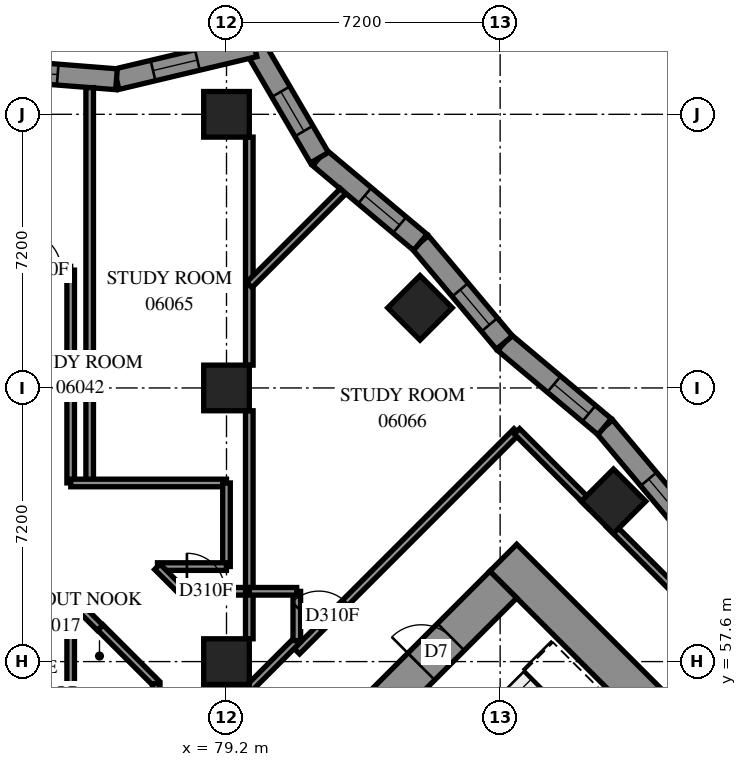
"""IFC4 building model, lengths in metres.
Left out: names, types, materials, properties, quantities, classifications, styles, units other than length and angle.
Written with IfcOpenShell. Run it as: python <this file> out.ifc"""

import sys

from ifc_helpers import new_model, si_unit, direction, frame, frame_2d, origin, origin_2d, place, context, subcontext, project, spatial, polyline, rectangle, outline, extrude, element, fill, save


model = new_model("IFC4")
c1 = context("Model", 3, precision=1e-05, world=origin(), true_north=direction((0.0, 1.0)))
c2 = subcontext(c1, "Body", "Model", "MODEL_VIEW")
j1 = project(units=[si_unit("LENGTHUNIT", "METRE"), si_unit("PLANEANGLEUNIT", "RADIAN")], contexts=[c1])
p1 = place(None, origin())
s1 = spatial("IfcSite", under=j1, at=p1, CompositionType="ELEMENT")
p2 = place(p1, origin())
s2 = spatial("IfcBuilding", under=s1, at=p2, CompositionType="ELEMENT")
p3 = place(p2, frame((0.0, 0.0, 27.0)))
s3 = spatial("IfcBuildingStorey", under=s2, at=p3, CompositionType="ELEMENT", Elevation=27.0)
for number, where, z_axis, x_axis in (
    (1, (79.2, 57.6, 0.0), (0.0, 0.0, 1.0), (1.0, 0.0, 0.0)),
    (2, (79.2, 64.8, 0.0), (0.0, 0.0, 1.0), (1.0, 0.0, 0.0)),
    (3, (79.2, 72.0, 0.0), (0.0, 0.0, 1.0), (1.0, 0.0, 0.0)),
    (4, (84.291, 66.909, 0.0), (0.0, 0.0, 1.0), (0.707, -0.707, 0.0)),
    (5, (89.382, 61.818, 0.0), (0.0, 0.0, 1.0), (0.707, -0.707, 0.0)),
):
    element("IfcColumn", number, at=place(p3, frame(where, z_axis=z_axis, x_axis=x_axis)), inside=s3, PredefinedType="COLUMN", context=c2, shape_type="SweptSolid", body=[
        extrude(rectangle(XDim=1.2, YDim=1.2, at=origin_2d()), origin(), (0.0, 0.0, 1.0), 3.1),
    ])
p4 = place(p3, frame((86.483, 60.333, -0.3), z_axis=(0.0, 0.0, 1.0), x_axis=(0.70710983, -0.7071037324, 0.0)))
e6 = element("IfcWall", 6, at=p4, inside=s3, PredefinedType="SHEAR", context=c2, shape_type="SweptSolid", body=[
    extrude(rectangle(XDim=16.4, YDim=1.0, at=frame_2d((8.2, 0.0))), origin(), (0.0, 0.0, 1.0), 2.7),
])
p5 = place(p4, frame((11.0, 0.0, 0.3)))
e7 = element("IfcOpeningElement", 7, at=p5, cuts=e6, PredefinedType="OPENING", context=c2, shape_type="SweptSolid", body=[
    extrude(rectangle(XDim=0.8, YDim=2.1, at=frame_2d((0.4, 1.05))), frame((0.0, 0.51, 0.0), z_axis=(0.0, -1.0, 0.0), x_axis=(1.0, 0.0, 0.0)), (0.0, 0.0, 1.0), 1.02),
])
p6 = place(p3, frame((76.301, 49.443, -0.3), z_axis=(0.0, 0.0, 1.0), x_axis=(0.7071067812, 0.7071067812, 0.0)))
e8 = element("IfcWall", 8, at=p6, inside=s3, PredefinedType="SHEAR", context=c2, shape_type="SweptSolid", body=[
    extrude(rectangle(XDim=14.4, YDim=1.0, at=frame_2d((7.2, 0.0))), origin(), (0.0, 0.0, 1.0), 2.7),
])
p7 = place(p6, frame((4.55, 0.0, 0.3)))
e9 = element("IfcOpeningElement", 9, at=p7, cuts=e8, PredefinedType="OPENING", context=c2, shape_type="SweptSolid", body=[
    extrude(rectangle(XDim=1.1, YDim=2.1, at=frame_2d((0.55, 1.05))), frame((0.0, 0.51, 0.0), z_axis=(0.0, -1.0, 0.0), x_axis=(1.0, 0.0, 0.0)), (0.0, 0.0, 1.0), 1.02),
])
p8 = place(p6, frame((11.35, 0.0, 0.3)))
e10 = element("IfcOpeningElement", 10, at=p8, cuts=e8, PredefinedType="OPENING", context=c2, shape_type="SweptSolid", body=[
    extrude(rectangle(XDim=1.1, YDim=2.1, at=frame_2d((0.55, 1.05))), frame((0.0, 0.51, 0.0), z_axis=(0.0, -1.0, 0.0), x_axis=(1.0, 0.0, 0.0)), (0.0, 0.0, 1.0), 1.02),
])
p9 = place(p3, frame((91.363, 61.144, 0.0), z_axis=(0.0, 0.0, 1.0), x_axis=(-0.6428036801, 0.7660309582, 0.0)))
e11 = element("IfcWall", 11, at=p9, inside=s3, PredefinedType="SOLIDWALL", context=c2, shape_type="SweptSolid", body=[
    extrude(outline(polyline([(0.024, -0.275), (3.466, -0.275), (3.418, 0.275), (-0.024, 0.275), (0.024, -0.275)])), origin(), (0.0, 0.0, 1.0), 3.1),
])
p10 = place(p9, frame((0.442, 0.0, 0.5)))
e12 = element("IfcOpeningElement", 12, at=p10, cuts=e11, PredefinedType="OPENING", context=c2, shape_type="SweptSolid", body=[
    extrude(rectangle(XDim=1.2, YDim=2.45, at=frame_2d((0.6, 1.225))), frame((0.0, 0.285, 0.0), z_axis=(0.0, -1.0, 0.0), x_axis=(1.0, 0.0, 0.0)), (0.0, 0.0, 1.0), 0.57),
])
p11 = place(p3, frame((89.15, 63.781, 0.0), z_axis=(0.0, 0.0, 1.0), x_axis=(-0.7660309582, 0.6428036801, 0.0)))
e13 = element("IfcWall", 13, at=p11, inside=s3, PredefinedType="SOLIDWALL", context=c2, shape_type="SweptSolid", body=[
    extrude(outline(polyline([(-0.024, -0.275), (3.418, -0.275), (3.466, 0.275), (0.024, 0.275), (-0.024, -0.275)])), origin(), (0.0, 0.0, 1.0), 3.1),
])
p12 = place(p11, frame((0.54, 0.0, 0.5)))
e14 = element("IfcOpeningElement", 14, at=p12, cuts=e13, PredefinedType="OPENING", context=c2, shape_type="SweptSolid", body=[
    extrude(rectangle(XDim=1.2, YDim=2.45, at=frame_2d((0.6, 1.225))), frame((0.0, 0.285, 0.0), z_axis=(0.0, -1.0, 0.0), x_axis=(1.0, 0.0, 0.0)), (0.0, 0.0, 1.0), 0.57),
])
p13 = place(p3, frame((86.513, 65.994, 0.0), z_axis=(0.0, 0.0, 1.0), x_axis=(-0.6427893761, 0.7660429609, 0.0)))
e15 = element("IfcWall", 15, at=p13, inside=s3, PredefinedType="SOLIDWALL", context=c2, shape_type="SweptSolid", body=[
    extrude(outline(polyline([(0.024, -0.275), (3.466, -0.275), (3.418, 0.275), (-0.024, 0.275), (0.024, -0.275)])), origin(), (0.0, 0.0, 1.0), 3.1),
])
p14 = place(p13, frame((0.613, 0.0, 0.5)))
e16 = element("IfcOpeningElement", 16, at=p14, cuts=e15, PredefinedType="OPENING", context=c2, shape_type="SweptSolid", body=[
    extrude(rectangle(XDim=1.2, YDim=2.45, at=frame_2d((0.6, 1.225))), frame((0.0, 0.285, 0.0), z_axis=(0.0, -1.0, 0.0), x_axis=(1.0, 0.0, 0.0)), (0.0, 0.0, 1.0), 0.57),
])
p15 = place(p3, frame((84.3, 68.631, 0.0), z_axis=(0.0, 0.0, 1.0), x_axis=(-0.7660412241, 0.6427914459, 0.0)))
e17 = element("IfcWall", 17, at=p15, inside=s3, PredefinedType="SOLIDWALL", context=c2, shape_type="SweptSolid", body=[
    extrude(outline(polyline([(-0.024, -0.275), (3.418, -0.275), (3.514, 0.275), (0.024, 0.275), (-0.024, -0.275)])), origin(), (0.0, 0.0, 1.0), 3.1),
])
p16 = place(p15, frame((0.711, 0.0, 0.5)))
e18 = element("IfcOpeningElement", 18, at=p16, cuts=e17, PredefinedType="OPENING", context=c2, shape_type="SweptSolid", body=[
    extrude(rectangle(XDim=1.2, YDim=2.45, at=frame_2d((0.6, 1.225))), frame((0.0, 0.285, 0.0), z_axis=(0.0, -1.0, 0.0), x_axis=(1.0, 0.0, 0.0)), (0.0, 0.0, 1.0), 0.57),
])
p17 = place(p3, frame((81.645, 70.859, 0.0), z_axis=(0.0, 0.0, 1.0), x_axis=(-0.5044689103, 0.8634298573, 0.0)))
e19 = element("IfcWall", 19, at=p17, inside=s3, PredefinedType="SOLIDWALL", context=c2, shape_type="SweptSolid", body=[
    extrude(outline(polyline([(0.048, -0.275), (3.593, -0.275), (3.186, 0.275), (-0.048, 0.275), (0.048, -0.275)])), origin(), (0.0, 0.0, 1.0), 3.1),
])
p18 = place(p17, frame((0.811, 0.0, 0.5)))
e20 = element("IfcOpeningElement", 20, at=p18, cuts=e19, PredefinedType="OPENING", context=c2, shape_type="SweptSolid", body=[
    extrude(rectangle(XDim=1.2, YDim=2.45, at=frame_2d((0.6, 1.225))), frame((0.0, 0.285, 0.0), z_axis=(0.0, -1.0, 0.0), x_axis=(1.0, 0.0, 0.0)), (0.0, 0.0, 1.0), 0.57),
])
p19 = place(p3, frame((79.935, 73.785, 0.0), z_axis=(0.0, 0.0, 1.0), x_axis=(-0.9728826648, -0.2312992014, 0.0)))
e21 = element("IfcWall", 21, at=p19, inside=s3, PredefinedType="SOLIDWALL", context=c2, shape_type="SweptSolid", body=[
    extrude(outline(polyline([(-0.204, -0.275), (3.687, -0.275), (3.774, 0.275), (0.204, 0.275), (-0.204, -0.275)])), origin(), (0.0, 0.0, 1.0), 3.1),
])
p20 = place(p19, frame((1.543, 0.0, 0.5)))
e22 = element("IfcOpeningElement", 22, at=p20, cuts=e21, PredefinedType="OPENING", context=c2, shape_type="SweptSolid", body=[
    extrude(rectangle(XDim=1.2, YDim=2.45, at=frame_2d((0.6, 1.225))), frame((0.0, 0.285, 0.0), z_axis=(0.0, -1.0, 0.0), x_axis=(1.0, 0.0, 0.0)), (0.0, 0.0, 1.0), 0.57),
])
p21 = place(p3, frame((76.306, 72.922, 0.0), z_axis=(0.0, 0.0, 1.0), x_axis=(-0.9968745318, 0.0790010628, 0.0)))
e23 = element("IfcWall", 23, at=p21, inside=s3, PredefinedType="SOLIDWALL", context=c2, shape_type="SweptSolid", body=[
    extrude(outline(polyline([(0.043, -0.275), (3.841, -0.275), (3.797, 0.275), (-0.043, 0.275), (0.043, -0.275)])), origin(), (0.0, 0.0, 1.0), 3.1),
])
p22 = place(p21, frame((1.553, 0.0, 0.5)))
e24 = element("IfcOpeningElement", 24, at=p22, cuts=e23, PredefinedType="OPENING", context=c2, shape_type="SweptSolid", body=[
    extrude(rectangle(XDim=1.2, YDim=2.45, at=frame_2d((0.6, 1.225))), frame((0.0, 0.285, 0.0), z_axis=(0.0, -1.0, 0.0), x_axis=(1.0, 0.0, 0.0)), (0.0, 0.0, 1.0), 0.57),
])
p23 = place(p3, frame((54.5, 67.9, 0.0), z_axis=(0.0, 0.0, 1.0), x_axis=(1.0, 0.0, 0.0)))
e25 = element("IfcWall", 25, at=p23, inside=s3, PredefinedType="PARTITIONING", context=c2, shape_type="SweptSolid", body=[
    extrude(rectangle(XDim=20.6, YDim=0.2, at=frame_2d((10.3, 0.0))), origin(), (0.0, 0.0, 1.0), 3.1),
])
p24 = place(p23, frame((0.255, 0.0, 0.0)))
e26 = element("IfcOpeningElement", 26, at=p24, cuts=e25, PredefinedType="OPENING", context=c2, shape_type="SweptSolid", body=[
    extrude(rectangle(XDim=1.0, YDim=2.1, at=frame_2d((0.5, 1.05))), frame((0.0, 0.11, 0.0), z_axis=(0.0, -1.0, 0.0), x_axis=(1.0, 0.0, 0.0)), (0.0, 0.0, 1.0), 0.22),
])
p25 = place(p23, frame((19.345, 0.0, 0.0)))
e27 = element("IfcOpeningElement", 27, at=p25, cuts=e25, PredefinedType="OPENING", context=c2, shape_type="SweptSolid", body=[
    extrude(rectangle(XDim=1.0, YDim=2.1, at=frame_2d((0.5, 1.05))), frame((0.0, 0.11, 0.0), z_axis=(0.0, -1.0, 0.0), x_axis=(1.0, 0.0, 0.0)), (0.0, 0.0, 1.0), 0.22),
])
p26 = place(p23, frame((5.45, 0.0, 0.0)))
e28 = element("IfcOpeningElement", 28, at=p26, cuts=e25, PredefinedType="OPENING", context=c2, shape_type="SweptSolid", body=[
    extrude(rectangle(XDim=0.9, YDim=2.1, at=frame_2d((0.45, 1.05))), frame((0.0, 0.11, 0.0), z_axis=(0.0, -1.0, 0.0), x_axis=(1.0, 0.0, 0.0)), (0.0, 0.0, 1.0), 0.22),
])
p27 = place(p23, frame((7.1, 0.0, 0.0)))
e29 = element("IfcOpeningElement", 29, at=p27, cuts=e25, PredefinedType="OPENING", context=c2, shape_type="SweptSolid", body=[
    extrude(rectangle(XDim=0.9, YDim=2.1, at=frame_2d((0.45, 1.05))), frame((0.0, 0.11, 0.0), z_axis=(0.0, -1.0, 0.0), x_axis=(1.0, 0.0, 0.0)), (0.0, 0.0, 1.0), 0.22),
])
p28 = place(p23, frame((12.65, 0.0, 0.0)))
e30 = element("IfcOpeningElement", 30, at=p28, cuts=e25, PredefinedType="OPENING", context=c2, shape_type="SweptSolid", body=[
    extrude(rectangle(XDim=0.9, YDim=2.1, at=frame_2d((0.45, 1.05))), frame((0.0, 0.11, 0.0), z_axis=(0.0, -1.0, 0.0), x_axis=(1.0, 0.0, 0.0)), (0.0, 0.0, 1.0), 0.22),
])
p29 = place(p23, frame((14.3, 0.0, 0.0)))
e31 = element("IfcOpeningElement", 31, at=p29, cuts=e25, PredefinedType="OPENING", context=c2, shape_type="SweptSolid", body=[
    extrude(rectangle(XDim=0.9, YDim=2.1, at=frame_2d((0.45, 1.05))), frame((0.0, 0.11, 0.0), z_axis=(0.0, -1.0, 0.0), x_axis=(1.0, 0.0, 0.0)), (0.0, 0.0, 1.0), 0.22),
])
p30 = place(p3, frame((75.6, 62.3, 0.0), z_axis=(0.0, 0.0, 1.0), x_axis=(0.0, 1.0, 0.0)))
e32 = element("IfcWall", 32, at=p30, inside=s3, PredefinedType="PARTITIONING", context=c2, shape_type="SweptSolid", body=[
    extrude(rectangle(XDim=10.402, YDim=0.2, at=frame_2d((5.201, 0.0))), origin(), (0.0, 0.0, 1.0), 3.1),
])
p31 = place(p3, frame((81.052, 57.873, 0.0), z_axis=(0.0, 0.0, 1.0), x_axis=(0.7071067812, 0.7071067812, 0.0)))
e33 = element("IfcWall", 33, at=p31, inside=s3, PredefinedType="PARTITIONING", context=c2, shape_type="SweptSolid", body=[
    extrude(rectangle(XDim=8.18, YDim=0.2, at=frame_2d((4.09, 0.0))), origin(), (0.0, 0.0, 1.0), 3.1),
])
p32 = place(p31, frame((0.823, 0.0, 0.0)))
e34 = element("IfcOpeningElement", 34, at=p32, cuts=e33, PredefinedType="OPENING", context=c2, shape_type="SweptSolid", body=[
    extrude(rectangle(XDim=1.0, YDim=2.1, at=frame_2d((0.5, 1.05))), frame((0.0, 0.11, 0.0), z_axis=(0.0, -1.0, 0.0), x_axis=(1.0, 0.0, 0.0)), (0.0, 0.0, 1.0), 0.22),
])
p33 = place(p3, frame((89.271, 61.215, 0.0), z_axis=(0.0, 0.0, 1.0), x_axis=(0.7071067812, -0.7071067812, 0.0)))
e35 = element("IfcWall", 35, at=p33, inside=s3, PredefinedType="PARTITIONING", context=c2, shape_type="SweptSolid", body=[
    extrude(rectangle(XDim=6.505, YDim=0.2, at=frame_2d((3.253, 0.0))), origin(), (0.0, 0.0, 1.0), 3.1),
])
p34 = place(p3, frame((79.8, 65.4, 0.0), z_axis=(0.0, 0.0, 1.0), x_axis=(0.0, 1.0, 0.0)))
e36 = element("IfcWall", 36, at=p34, inside=s3, PredefinedType="PARTITIONING", context=c2, shape_type="SweptSolid", body=[
    extrude(rectangle(XDim=6.0, YDim=0.2, at=frame_2d((3.0, 0.0))), origin(), (0.0, 0.0, 1.0), 3.1),
])
p35 = place(p3, frame((75.1, 62.302, 0.0), z_axis=(0.0, 0.0, 1.0), x_axis=(0.0, 1.0, 0.0)))
e37 = element("IfcWall", 37, at=p35, inside=s3, PredefinedType="PARTITIONING", context=c2, shape_type="SweptSolid", body=[
    extrude(rectangle(XDim=5.598, YDim=0.2, at=frame_2d((2.799, 0.0))), origin(), (0.0, 0.0, 1.0), 3.1),
])
p36 = place(p3, frame((79.8, 59.45, 0.0), z_axis=(0.0, 0.0, 1.0), x_axis=(0.0, 1.0, 0.0)))
e38 = element("IfcWall", 38, at=p36, inside=s3, PredefinedType="PARTITIONING", context=c2, shape_type="SweptSolid", body=[
    extrude(rectangle(XDim=4.75, YDim=0.2, at=frame_2d((2.375, 0.0))), origin(), (0.0, 0.0, 1.0), 3.1),
])
p37 = place(p3, frame((75.1, 55.102, 0.0), z_axis=(0.0, 0.0, 1.0), x_axis=(0.0, 1.0, 0.0)))
e39 = element("IfcWall", 39, at=p37, inside=s3, PredefinedType="PARTITIONING", context=c2, shape_type="SweptSolid", body=[
    extrude(rectangle(XDim=4.166, YDim=0.2, at=frame_2d((2.083, 0.0))), origin(), (0.0, 0.0, 1.0), 3.1),
])
p38 = place(p3, frame((75.102, 62.3, 0.0), z_axis=(0.0, 0.0, 1.0), x_axis=(1.0, 0.0, 0.0)))
e40 = element("IfcWall", 40, at=p38, inside=s3, PredefinedType="PARTITIONING", context=c2, shape_type="SweptSolid", body=[
    extrude(rectangle(XDim=4.098, YDim=0.2, at=frame_2d((2.049, 0.0))), origin(), (0.0, 0.0, 1.0), 3.1),
])
p39 = place(p3, frame((79.799, 67.509, 0.0), z_axis=(0.0, 0.0, 1.0), x_axis=(0.7070924582, 0.7071211039, 0.0)))
e41 = element("IfcWall", 41, at=p39, inside=s3, PredefinedType="PARTITIONING", context=c2, shape_type="SweptSolid", body=[
    extrude(rectangle(XDim=3.491, YDim=0.2, at=frame_2d((1.745, 0.0))), origin(), (0.0, 0.0, 1.0), 3.1),
])
p40 = place(p3, frame((86.841, 63.659, 0.0), z_axis=(0.0, 0.0, 1.0), x_axis=(0.7067795096, -0.7074339014, 0.0)))
e42 = element("IfcWall", 42, at=p40, inside=s3, PredefinedType="PARTITIONING", context=c2, shape_type="SweptSolid", body=[
    extrude(rectangle(XDim=2.751, YDim=0.2, at=frame_2d((1.375, 0.0))), origin(), (0.0, 0.0, 1.0), 3.1),
])
p41 = place(p3, frame((79.2, 60.102, 0.0), z_axis=(0.0, 0.0, 1.0), x_axis=(0.0, 1.0, 0.0)))
e43 = element("IfcWall", 43, at=p41, inside=s3, PredefinedType="PARTITIONING", context=c2, shape_type="SweptSolid", body=[
    extrude(rectangle(XDim=2.198, YDim=0.2, at=frame_2d((1.099, 0.0))), origin(), (0.0, 0.0, 1.0), 3.1),
])
p42 = place(p3, frame((75.879, 58.497, 0.0), z_axis=(0.0, 0.0, 1.0), x_axis=(0.7075866635, -0.706626573, 0.0)))
e44 = element("IfcWall", 44, at=p42, inside=s3, PredefinedType="PARTITIONING", context=c2, shape_type="SweptSolid", body=[
    extrude(rectangle(XDim=2.083, YDim=0.2, at=frame_2d((1.042, 0.0))), origin(), (0.0, 0.0, 1.0), 3.1),
])
p43 = place(p3, frame((77.384, 60.1, 0.0), z_axis=(0.0, 0.0, 1.0), x_axis=(1.0, 0.0, 0.0)))
e45 = element("IfcWall", 45, at=p43, inside=s3, PredefinedType="PARTITIONING", context=c2, shape_type="SweptSolid", body=[
    extrude(rectangle(XDim=1.814, YDim=0.2, at=frame_2d((0.907, 0.0))), origin(), (0.0, 0.0, 1.0), 3.1),
])
p44 = place(p3, frame((78.032, 59.45, 0.0), z_axis=(0.0, 0.0, 1.0), x_axis=(1.0, 0.0, 0.0)))
e46 = element("IfcWall", 46, at=p44, inside=s3, PredefinedType="PARTITIONING", context=c2, shape_type="SweptSolid", body=[
    extrude(rectangle(XDim=1.768, YDim=0.2, at=frame_2d((0.884, 0.0))), origin(), (0.0, 0.0, 1.0), 3.1),
])
p45 = place(p44, frame((0.126, 0.0, 0.0)))
e47 = element("IfcOpeningElement", 47, at=p45, cuts=e46, PredefinedType="OPENING", context=c2, shape_type="SweptSolid", body=[
    extrude(rectangle(XDim=1.0, YDim=2.1, at=frame_2d((0.5, 1.05))), frame((0.0, 0.11, 0.0), z_axis=(0.0, -1.0, 0.0), x_axis=(1.0, 0.0, 0.0)), (0.0, 0.0, 1.0), 0.22),
])
p46 = place(p3, frame((79.801, 56.905, 0.0), z_axis=(0.0, 0.0, 1.0), x_axis=(0.7071067812, 0.7071067812, 0.0)))
e48 = element("IfcWall", 48, at=p46, inside=s3, PredefinedType="PARTITIONING", context=c2, shape_type="SweptSolid", body=[
    extrude(rectangle(XDim=1.765, YDim=0.2, at=frame_2d((0.882, 0.0))), origin(), (0.0, 0.0, 1.0), 3.1),
])
p47 = place(p3, frame((81.05, 58.152, 0.0), z_axis=(0.0, 0.0, 1.0), x_axis=(0.0, 1.0, 0.0)))
e49 = element("IfcWall", 49, at=p47, inside=s3, PredefinedType="PARTITIONING", context=c2, shape_type="SweptSolid", body=[
    extrude(rectangle(XDim=1.296, YDim=0.2, at=frame_2d((0.648, 0.0))), origin(), (0.0, 0.0, 1.0), 3.1),
])
p48 = place(p3, frame((77.35, 55.752, 0.0), z_axis=(0.0, 0.0, 1.0), x_axis=(0.0, 1.0, 0.0)))
e50 = element("IfcWall", 50, at=p48, inside=s3, PredefinedType="PARTITIONING", context=c2, shape_type="SweptSolid", body=[
    extrude(rectangle(XDim=1.268, YDim=0.2, at=frame_2d((0.634, 0.0))), origin(), (0.0, 0.0, 1.0), 3.1),
])
p49 = place(p3, frame((79.8, 58.2, 0.0), z_axis=(0.0, 0.0, 1.0), x_axis=(0.0, 1.0, 0.0)))
e51 = element("IfcWall", 51, at=p49, inside=s3, PredefinedType="PARTITIONING", context=c2, shape_type="SweptSolid", body=[
    extrude(rectangle(XDim=1.25, YDim=0.2, at=frame_2d((0.625, 0.0))), origin(), (0.0, 0.0, 1.0), 3.1),
])
p50 = place(p3, frame((79.8, 59.45, 0.0), z_axis=(0.0, 0.0, 1.0), x_axis=(1.0, 0.0, 0.0)))
e52 = element("IfcWall", 52, at=p50, inside=s3, PredefinedType="PARTITIONING", context=c2, shape_type="SweptSolid", body=[
    extrude(rectangle(XDim=1.248, YDim=0.2, at=frame_2d((0.624, 0.0))), origin(), (0.0, 0.0, 1.0), 3.1),
])
p51 = place(p3, frame((77.381, 60.095, 0.0), z_axis=(0.0, 0.0, 1.0), x_axis=(0.7071067812, -0.7071067812, 0.0)))
e53 = element("IfcWall", 53, at=p51, inside=s3, PredefinedType="PARTITIONING", context=c2, shape_type="SweptSolid", body=[
    extrude(rectangle(XDim=0.916, YDim=0.2, at=frame_2d((0.458, 0.0))), origin(), (0.0, 0.0, 1.0), 3.1),
])
p52 = place(p3, frame((75.297, 59.067, 0.0), z_axis=(0.0, 0.0, 1.0), x_axis=(0.7071067812, -0.7071067812, 0.0)))
e54 = element("IfcWall", 54, at=p52, inside=s3, PredefinedType="PARTITIONING", context=c2, shape_type="SweptSolid", body=[
    extrude(rectangle(XDim=0.815, YDim=0.2, at=frame_2d((0.407, 0.0))), origin(), (0.0, 0.0, 1.0), 3.1),
])
p53 = place(p10, origin())
e55 = element("IfcWindow", 55, at=p53, inside=s3, PartitioningType="SINGLE_PANEL", PredefinedType="WINDOW", context=c2, shape_type="SweptSolid", body=[
    extrude(rectangle(XDim=1.2, YDim=2.45, at=frame_2d((0.6, 1.225))), frame((0.0, 0.155, 0.0), z_axis=(0.0, -1.0, 0.0), x_axis=(1.0, 0.0, 0.0)), (0.0, 0.0, 1.0), 0.06),
])
fill(e12, e55)
p54 = place(p12, origin())
e56 = element("IfcWindow", 56, at=p54, inside=s3, PartitioningType="SINGLE_PANEL", PredefinedType="WINDOW", context=c2, shape_type="SweptSolid", body=[
    extrude(rectangle(XDim=1.2, YDim=2.45, at=frame_2d((0.6, 1.225))), frame((0.0, 0.155, 0.0), z_axis=(0.0, -1.0, 0.0), x_axis=(1.0, 0.0, 0.0)), (0.0, 0.0, 1.0), 0.06),
])
fill(e14, e56)
p55 = place(p14, origin())
e57 = element("IfcWindow", 57, at=p55, inside=s3, PartitioningType="SINGLE_PANEL", PredefinedType="WINDOW", context=c2, shape_type="SweptSolid", body=[
    extrude(rectangle(XDim=1.2, YDim=2.45, at=frame_2d((0.6, 1.225))), frame((0.0, 0.155, 0.0), z_axis=(0.0, -1.0, 0.0), x_axis=(1.0, 0.0, 0.0)), (0.0, 0.0, 1.0), 0.06),
])
fill(e16, e57)
p56 = place(p16, origin())
e58 = element("IfcWindow", 58, at=p56, inside=s3, PartitioningType="SINGLE_PANEL", PredefinedType="WINDOW", context=c2, shape_type="SweptSolid", body=[
    extrude(rectangle(XDim=1.2, YDim=2.45, at=frame_2d((0.6, 1.225))), frame((0.0, 0.155, 0.0), z_axis=(0.0, -1.0, 0.0), x_axis=(1.0, 0.0, 0.0)), (0.0, 0.0, 1.0), 0.06),
])
fill(e18, e58)
p57 = place(p18, origin())
e59 = element("IfcWindow", 59, at=p57, inside=s3, PartitioningType="SINGLE_PANEL", PredefinedType="WINDOW", context=c2, shape_type="SweptSolid", body=[
    extrude(rectangle(XDim=1.2, YDim=2.45, at=frame_2d((0.6, 1.225))), frame((0.0, 0.155, 0.0), z_axis=(0.0, -1.0, 0.0), x_axis=(1.0, 0.0, 0.0)), (0.0, 0.0, 1.0), 0.06),
])
fill(e20, e59)
p58 = place(p20, origin())
e60 = element("IfcWindow", 60, at=p58, inside=s3, PartitioningType="SINGLE_PANEL", PredefinedType="WINDOW", context=c2, shape_type="SweptSolid", body=[
    extrude(rectangle(XDim=1.2, YDim=2.45, at=frame_2d((0.6, 1.225))), frame((0.0, 0.155, 0.0), z_axis=(0.0, -1.0, 0.0), x_axis=(1.0, 0.0, 0.0)), (0.0, 0.0, 1.0), 0.06),
])
fill(e22, e60)
p59 = place(p22, origin())
e61 = element("IfcWindow", 61, at=p59, inside=s3, PartitioningType="SINGLE_PANEL", PredefinedType="WINDOW", context=c2, shape_type="SweptSolid", body=[
    extrude(rectangle(XDim=1.2, YDim=2.45, at=frame_2d((0.6, 1.225))), frame((0.0, 0.155, 0.0), z_axis=(0.0, -1.0, 0.0), x_axis=(1.0, 0.0, 0.0)), (0.0, 0.0, 1.0), 0.06),
])
fill(e24, e61)
p60 = place(p8, origin())
e62 = element("IfcDoor", 62, at=p60, inside=s3, OperationType="SINGLE_SWING_LEFT", PredefinedType="DOOR", context=c2, shape_type="SweptSolid", body=[
    extrude(rectangle(XDim=1.1, YDim=2.1, at=frame_2d((0.55, 1.05))), frame((0.0, 0.025, 0.0), z_axis=(0.0, -1.0, 0.0), x_axis=(1.0, 0.0, 0.0)), (0.0, 0.0, 1.0), 0.05),
])
fill(e10, e62)
p61 = place(p25, origin())
e63 = element("IfcDoor", 63, at=p61, inside=s3, OperationType="SINGLE_SWING_RIGHT", PredefinedType="DOOR", context=c2, shape_type="SweptSolid", body=[
    extrude(rectangle(XDim=1.0, YDim=2.1, at=frame_2d((0.5, 1.05))), frame((0.0, 0.025, 0.0), z_axis=(0.0, -1.0, 0.0), x_axis=(1.0, 0.0, 0.0)), (0.0, 0.0, 1.0), 0.05),
])
fill(e27, e63)
p62 = place(p45, origin())
e64 = element("IfcDoor", 64, at=p62, inside=s3, OperationType="SINGLE_SWING_LEFT", PredefinedType="DOOR", context=c2, shape_type="SweptSolid", body=[
    extrude(rectangle(XDim=1.0, YDim=2.1, at=frame_2d((0.5, 1.05))), frame((0.0, 0.025, 0.0), z_axis=(0.0, -1.0, 0.0), x_axis=(1.0, 0.0, 0.0)), (0.0, 0.0, 1.0), 0.05),
])
fill(e47, e64)
p63 = place(p32, origin())
e65 = element("IfcDoor", 65, at=p63, inside=s3, OperationType="SINGLE_SWING_RIGHT", PredefinedType="DOOR", context=c2, shape_type="SweptSolid", body=[
    extrude(rectangle(XDim=1.0, YDim=2.1, at=frame_2d((0.5, 1.05))), frame((0.0, 0.025, 0.0), z_axis=(0.0, -1.0, 0.0), x_axis=(1.0, 0.0, 0.0)), (0.0, 0.0, 1.0), 0.05),
])
fill(e34, e65)
save(model, sys.argv[1])
